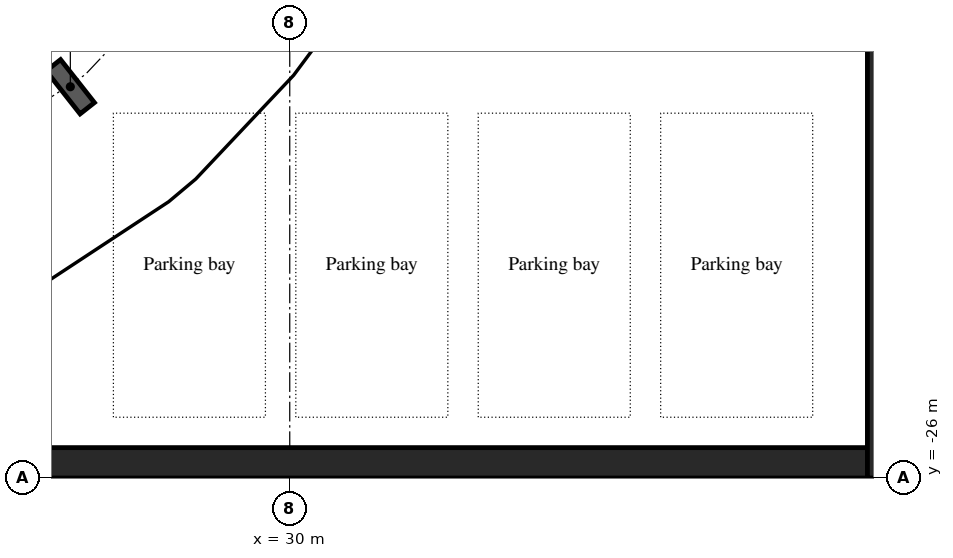
"""IFC4 building model, lengths in metres.
Left out: names, types, materials, properties, quantities, classifications, styles, units other than length and angle.
Written with IfcOpenShell. Run it as: python <this file> out.ifc"""

import sys

from ifc_helpers import new_model, si_unit, direction, frame, frame_2d, origin, origin_2d, place, context, subcontext, project, spatial, rectangle, i_section, extrude, element, save


model = new_model("IFC4")
c1 = context("Model", 3, precision=1e-05, world=origin(), true_north=direction((0.0, 1.0)))
c2 = subcontext(c1, "Body", "Model", "MODEL_VIEW")
j1 = project(units=[si_unit("LENGTHUNIT", "METRE"), si_unit("PLANEANGLEUNIT", "RADIAN")], contexts=[c1])
p1 = place(None, origin())
s1 = spatial("IfcSite", under=j1, at=p1, CompositionType="ELEMENT")
p2 = place(p1, origin())
s2 = spatial("IfcBuilding", under=s1, at=p2, CompositionType="ELEMENT")
p3 = place(p2, frame((0.0, 0.0, -8.4)))
s3 = spatial("IfcBuildingStorey", under=s2, at=p3, CompositionType="ELEMENT", Elevation=-8.4)
p4 = place(p3, frame((26.392, -19.565, 0.0), z_axis=(0.0, 0.0, 1.0), x_axis=(-0.7856835335, -0.618628632693, 0.0)))
e1 = element("IfcColumn", 1, at=p4, inside=s3, PredefinedType="COLUMN", context=c2, shape_type="SweptSolid", body=[
    extrude(i_section(OverallWidth=0.3, OverallDepth=0.9, WebThickness=0.019, FlangeThickness=0.035, FilletRadius=0.03, at=origin_2d()), origin(), (0.0, 0.0, 1.0), 3.82),
])
p5 = place(p3, frame((-40.0, -25.75, -0.4), z_axis=(0.0, 0.0, 1.0), x_axis=(1.0, 0.0, 0.0)))
e2 = element("IfcWall", 2, at=p5, inside=s3, PredefinedType="SOLIDWALL", context=c2, shape_type="SweptSolid", body=[
    extrude(rectangle(XDim=80.0, YDim=0.5, at=frame_2d((40.0, 0.0))), origin(), (0.0, 0.0, 1.0), 4.22),
])
p6 = place(p3, frame((39.75, -26.0, -0.4), z_axis=(0.0, 0.0, 1.0), x_axis=(0.0, 1.0, 0.0)))
e3 = element("IfcWall", 3, at=p6, inside=s3, PredefinedType="SOLIDWALL", context=c2, shape_type="SweptSolid", body=[
    extrude(rectangle(XDim=62.0, YDim=0.5, at=frame_2d((31.0, 0.0))), origin(), (0.0, 0.0, 1.0), 4.22),
])
save(model, sys.argv[1])
